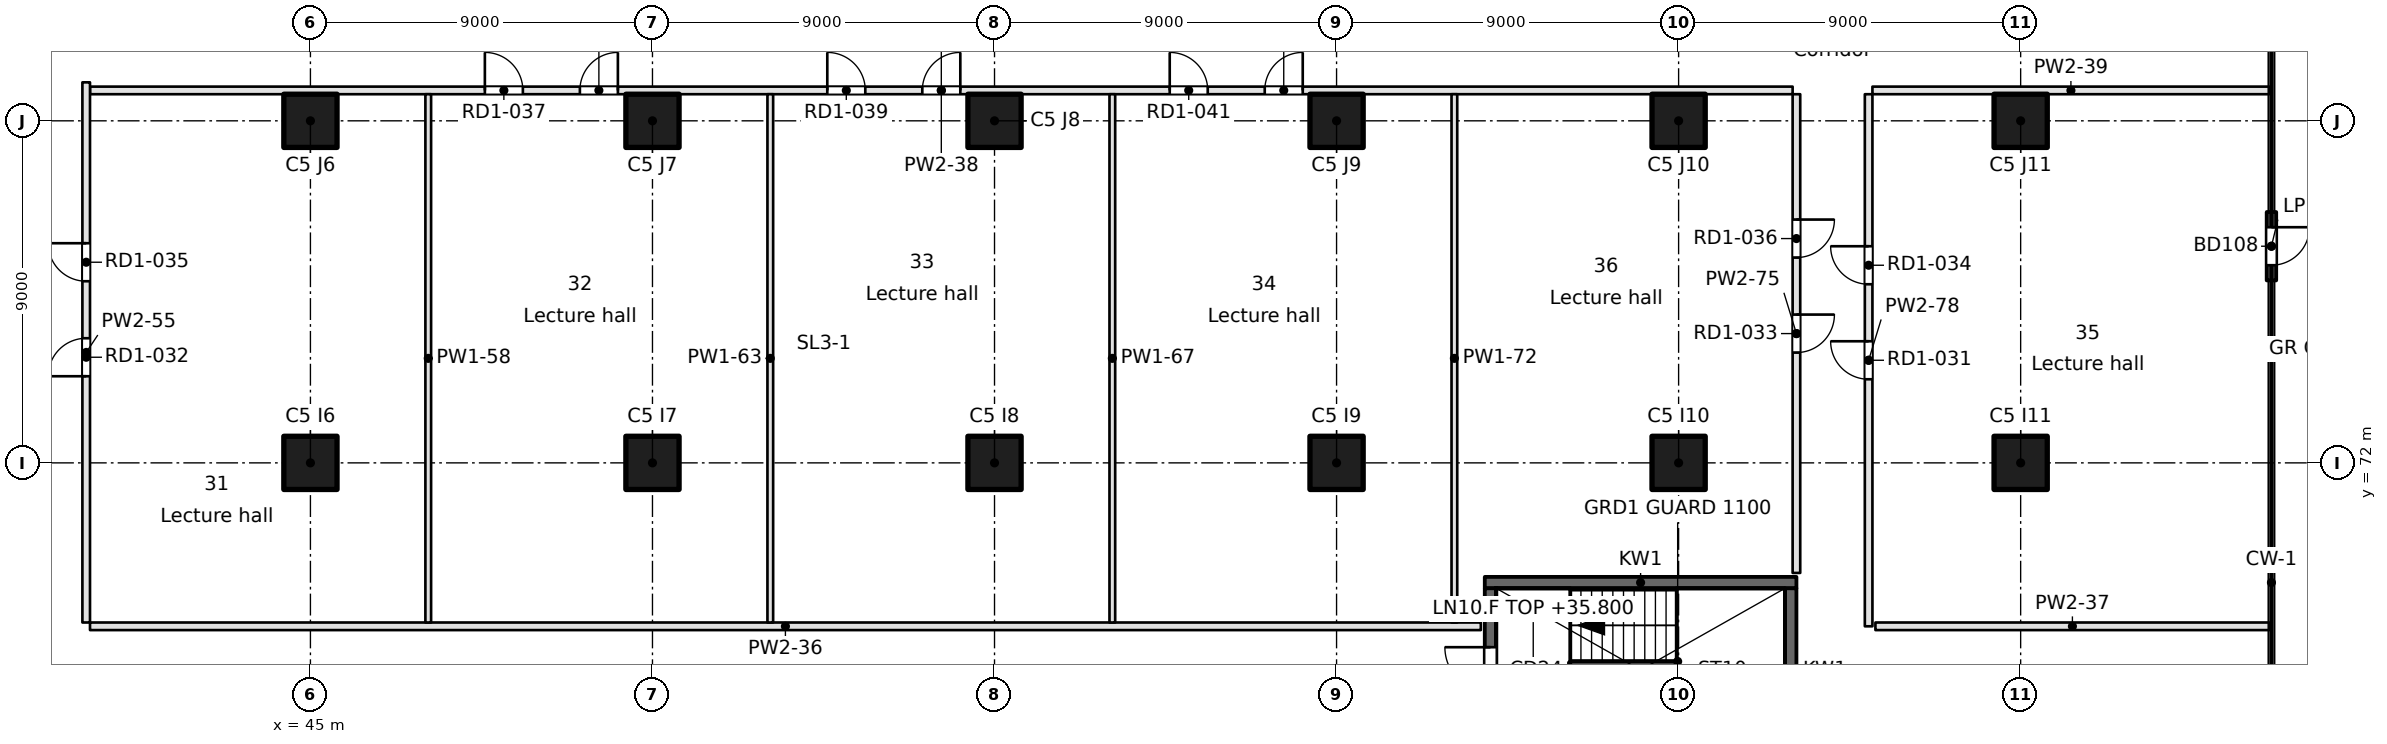
"""IFC4 building model, lengths in metres.
Left out: names, types, materials, properties, quantities, classifications, styles, units other than length and angle.
Written with IfcOpenShell. Run it as: python <this file> out.ifc"""

import sys

from ifc_helpers import new_model, si_unit, direction, frame, frame_2d, origin, origin_2d, place, context, subcontext, project, spatial, rectangle, extrude, element, fill, save


model = new_model("IFC4")
c1 = context("Model", 3, precision=1e-05, world=origin(), true_north=direction((0.0, 1.0)))
c2 = subcontext(c1, "Body", "Model", "MODEL_VIEW")
j1 = project(units=[si_unit("LENGTHUNIT", "METRE"), si_unit("PLANEANGLEUNIT", "RADIAN")], contexts=[c1])
p1 = place(None, origin())
s1 = spatial("IfcSite", under=j1, at=p1, CompositionType="ELEMENT")
p2 = place(p1, origin())
s2 = spatial("IfcBuilding", under=s1, at=p2, CompositionType="ELEMENT")
p3 = place(p2, frame((0.0, 0.0, 35.8)))
s3 = spatial("IfcBuildingStorey", under=s2, at=p3, CompositionType="ELEMENT", Elevation=35.8)
for number, where, z_axis, x_axis in (
    (1, (45.0, 72.0, 0.0), (0.0, 0.0, 1.0), (1.0, 0.0, 0.0)),
    (2, (45.0, 81.0, 0.0), (0.0, 0.0, 1.0), (1.0, 0.0, 0.0)),
    (3, (54.0, 72.0, 0.0), (0.0, 0.0, 1.0), (1.0, 0.0, 0.0)),
    (4, (54.0, 81.0, 0.0), (0.0, 0.0, 1.0), (1.0, 0.0, 0.0)),
    (5, (63.0, 72.0, 0.0), (0.0, 0.0, 1.0), (1.0, 0.0, 0.0)),
    (6, (63.0, 81.0, 0.0), (0.0, 0.0, 1.0), (1.0, 0.0, 0.0)),
    (7, (72.0, 72.0, 0.0), (0.0, 0.0, 1.0), (1.0, 0.0, 0.0)),
    (8, (72.0, 81.0, 0.0), (0.0, 0.0, 1.0), (1.0, 0.0, 0.0)),
    (9, (81.0, 72.0, 0.0), (0.0, 0.0, 1.0), (1.0, 0.0, 0.0)),
    (10, (81.0, 81.0, 0.0), (0.0, 0.0, 1.0), (1.0, 0.0, 0.0)),
    (11, (90.0, 72.0, 0.0), (0.0, 0.0, 1.0), (1.0, 0.0, 0.0)),
    (12, (90.0, 81.0, 0.0), (0.0, 0.0, 1.0), (1.0, 0.0, 0.0)),
):
    element("IfcColumn", number, at=place(p3, frame(where, z_axis=z_axis, x_axis=x_axis)), inside=s3, PredefinedType="COLUMN", context=c2, shape_type="SweptSolid", body=[
        extrude(rectangle(XDim=1.4, YDim=1.4, at=origin_2d()), origin(), (0.0, 0.0, 1.0), 3.7),
    ])
p4 = place(p3, frame((96.599, 76.801, 0.0), z_axis=(0.0, 0.0, 1.0), x_axis=(0.0, 1.0, 0.0)))
e13 = element("IfcWall", 13, at=p4, inside=s3, PredefinedType="SOLIDWALL", context=c2, shape_type="SweptSolid", body=[
    extrude(rectangle(XDim=1.8, YDim=0.25, at=frame_2d((0.9, 0.0))), origin(), (0.0, 0.0, 1.0), 3.3),
])
p5 = place(p4, frame((0.4, 0.0, 0.0)))
e14 = element("IfcOpeningElement", 14, at=p5, cuts=e13, PredefinedType="OPENING", context=c2, shape_type="SweptSolid", body=[
    extrude(rectangle(XDim=1.0, YDim=2.1, at=frame_2d((0.5, 1.05))), frame((0.0, 0.125, 0.0), z_axis=(0.0, -1.0, 0.0), x_axis=(1.0, 0.0, 0.0)), (0.0, 0.0, 1.0), 0.25),
])
p6 = place(p3, frame((75.9, 68.85, -0.4), z_axis=(0.0, 0.0, 1.0), x_axis=(1.0, 0.0, 0.0)))
e15 = element("IfcWall", 15, at=p6, inside=s3, PredefinedType="SOLIDWALL", context=c2, shape_type="SweptSolid", body=[
    extrude(rectangle(XDim=8.2, YDim=0.3, at=frame_2d((4.1, 0.0))), origin(), (0.0, 0.0, 1.0), 3.7),
])
p7 = place(p3, frame((76.05, 64.4, -0.4), z_axis=(0.0, 0.0, 1.0), x_axis=(0.0, 1.0, 0.0)))
e16 = element("IfcWall", 16, at=p7, inside=s3, PredefinedType="SOLIDWALL", context=c2, shape_type="SweptSolid", body=[
    extrude(rectangle(XDim=4.3, YDim=0.3, at=frame_2d((2.15, 0.0))), origin(), (0.0, 0.0, 1.0), 3.7),
])
p8 = place(p7, frame((1.55, 0.0, 0.4)))
e17 = element("IfcOpeningElement", 17, at=p8, cuts=e16, PredefinedType="OPENING", context=c2, shape_type="SweptSolid", body=[
    extrude(rectangle(XDim=1.2, YDim=2.1, at=frame_2d((0.6, 1.05))), frame((0.0, 0.15, 0.0), z_axis=(0.0, -1.0, 0.0), x_axis=(1.0, 0.0, 0.0)), (0.0, 0.0, 1.0), 0.3),
])
p9 = place(p3, frame((83.95, 64.4, -0.4), z_axis=(0.0, 0.0, 1.0), x_axis=(0.0, 1.0, 0.0)))
e18 = element("IfcWall", 18, at=p9, inside=s3, PredefinedType="SOLIDWALL", context=c2, shape_type="SweptSolid", body=[
    extrude(rectangle(XDim=4.3, YDim=0.3, at=frame_2d((2.15, 0.0))), origin(), (0.0, 0.0, 1.0), 3.7),
])
p10 = place(p3, frame((39.2, 67.7, 0.0), z_axis=(0.0, 0.0, 1.0), x_axis=(1.0, 0.0, 0.0)))
e19 = element("IfcWall", 19, at=p10, inside=s3, PredefinedType="PARTITIONING", context=c2, shape_type="SweptSolid", body=[
    extrude(rectangle(XDim=36.596, YDim=0.2, at=frame_2d((18.298, 0.0))), origin(), (0.0, 0.0, 1.0), 3.3),
])
p11 = place(p3, frame((86.178, 67.7, 0.0), z_axis=(0.0, 0.0, 1.0), x_axis=(1.0, 0.0, 0.0)))
e20 = element("IfcWall", 20, at=p11, inside=s3, PredefinedType="PARTITIONING", context=c2, shape_type="SweptSolid", body=[
    extrude(rectangle(XDim=10.366, YDim=0.2, at=frame_2d((5.183, 0.0))), origin(), (0.0, 0.0, 1.0), 3.3),
])
p12 = place(p3, frame((84.0, 81.8, 0.0), z_axis=(0.0, 0.0, 1.0), x_axis=(-1.0, 0.0, 0.0)))
e21 = element("IfcWall", 21, at=p12, inside=s3, PredefinedType="PARTITIONING", context=c2, shape_type="SweptSolid", body=[
    extrude(rectangle(XDim=44.8, YDim=0.2, at=frame_2d((22.4, 0.0))), origin(), (0.0, 0.0, 1.0), 3.3),
])
p13 = place(p12, frame((33.41, 0.0, 0.0)))
e22 = element("IfcOpeningElement", 22, at=p13, cuts=e21, PredefinedType="OPENING", context=c2, shape_type="SweptSolid", body=[
    extrude(rectangle(XDim=1.0, YDim=2.1, at=frame_2d((0.5, 1.05))), frame((0.0, 0.1, 0.0), z_axis=(0.0, -1.0, 0.0), x_axis=(1.0, 0.0, 0.0)), (0.0, 0.0, 1.0), 0.2),
])
p14 = place(p12, frame((30.91, 0.0, 0.0)))
e23 = element("IfcOpeningElement", 23, at=p14, cuts=e21, PredefinedType="OPENING", context=c2, shape_type="SweptSolid", body=[
    extrude(rectangle(XDim=1.0, YDim=2.1, at=frame_2d((0.5, 1.05))), frame((0.0, 0.1, 0.0), z_axis=(0.0, -1.0, 0.0), x_axis=(1.0, 0.0, 0.0)), (0.0, 0.0, 1.0), 0.2),
])
p15 = place(p12, frame((24.4, 0.0, 0.0)))
e24 = element("IfcOpeningElement", 24, at=p15, cuts=e21, PredefinedType="OPENING", context=c2, shape_type="SweptSolid", body=[
    extrude(rectangle(XDim=1.0, YDim=2.1, at=frame_2d((0.5, 1.05))), frame((0.0, 0.1, 0.0), z_axis=(0.0, -1.0, 0.0), x_axis=(1.0, 0.0, 0.0)), (0.0, 0.0, 1.0), 0.2),
])
p16 = place(p12, frame((21.9, 0.0, 0.0)))
e25 = element("IfcOpeningElement", 25, at=p16, cuts=e21, PredefinedType="OPENING", context=c2, shape_type="SweptSolid", body=[
    extrude(rectangle(XDim=1.0, YDim=2.1, at=frame_2d((0.5, 1.05))), frame((0.0, 0.1, 0.0), z_axis=(0.0, -1.0, 0.0), x_axis=(1.0, 0.0, 0.0)), (0.0, 0.0, 1.0), 0.2),
])
p17 = place(p12, frame((15.39, 0.0, 0.0)))
e26 = element("IfcOpeningElement", 26, at=p17, cuts=e21, PredefinedType="OPENING", context=c2, shape_type="SweptSolid", body=[
    extrude(rectangle(XDim=1.0, YDim=2.1, at=frame_2d((0.5, 1.05))), frame((0.0, 0.1, 0.0), z_axis=(0.0, -1.0, 0.0), x_axis=(1.0, 0.0, 0.0)), (0.0, 0.0, 1.0), 0.2),
])
p18 = place(p12, frame((12.89, 0.0, 0.0)))
e27 = element("IfcOpeningElement", 27, at=p18, cuts=e21, PredefinedType="OPENING", context=c2, shape_type="SweptSolid", body=[
    extrude(rectangle(XDim=1.0, YDim=2.1, at=frame_2d((0.5, 1.05))), frame((0.0, 0.1, 0.0), z_axis=(0.0, -1.0, 0.0), x_axis=(1.0, 0.0, 0.0)), (0.0, 0.0, 1.0), 0.2),
])
p19 = place(p3, frame((96.545, 81.8, 0.0), z_axis=(0.0, 0.0, 1.0), x_axis=(-1.0, 0.0, 0.0)))
e28 = element("IfcWall", 28, at=p19, inside=s3, PredefinedType="PARTITIONING", context=c2, shape_type="SweptSolid", body=[
    extrude(rectangle(XDim=10.445, YDim=0.2, at=frame_2d((5.222, 0.0))), origin(), (0.0, 0.0, 1.0), 3.3),
])
p20 = place(p3, frame((39.1, 82.012, 0.0), z_axis=(0.0, 0.0, 1.0), x_axis=(0.0, -1.0, 0.0)))
e29 = element("IfcWall", 29, at=p20, inside=s3, PredefinedType="PARTITIONING", context=c2, shape_type="SweptSolid", body=[
    extrude(rectangle(XDim=14.212, YDim=0.2, at=frame_2d((7.106, 0.0))), origin(), (0.0, 0.0, 1.0), 3.3),
])
p21 = place(p20, frame((6.733, 0.0, 0.0)))
e30 = element("IfcOpeningElement", 30, at=p21, cuts=e29, PredefinedType="OPENING", context=c2, shape_type="SweptSolid", body=[
    extrude(rectangle(XDim=1.0, YDim=2.1, at=frame_2d((0.5, 1.05))), frame((0.0, 0.1, 0.0), z_axis=(0.0, -1.0, 0.0), x_axis=(1.0, 0.0, 0.0)), (0.0, 0.0, 1.0), 0.2),
])
p22 = place(p20, frame((4.233, 0.0, 0.0)))
e31 = element("IfcOpeningElement", 31, at=p22, cuts=e29, PredefinedType="OPENING", context=c2, shape_type="SweptSolid", body=[
    extrude(rectangle(XDim=1.0, YDim=2.1, at=frame_2d((0.5, 1.05))), frame((0.0, 0.1, 0.0), z_axis=(0.0, -1.0, 0.0), x_axis=(1.0, 0.0, 0.0)), (0.0, 0.0, 1.0), 0.2),
])
for number, where, z_axis, x_axis in (
    (32, (48.1, 81.7, 0.0), (0.0, 0.0, 1.0), (0.0, -1.0, 0.0)),
    (33, (57.1, 81.7, 0.0), (0.0, 0.0, 1.0), (0.0, -1.0, 0.0)),
    (34, (66.1, 81.7, 0.0), (0.0, 0.0, 1.0), (0.0, -1.0, 0.0)),
    (35, (75.1, 81.7, 0.0), (0.0, 0.0, 1.0), (0.0, -1.0, 0.0)),
):
    element("IfcWall", number, at=place(p3, frame(where, z_axis=z_axis, x_axis=x_axis)), inside=s3, PredefinedType="PARTITIONING", context=c2, shape_type="SweptSolid", body=[
        extrude(rectangle(XDim=13.9, YDim=0.15, at=frame_2d((6.95, 0.0))), origin(), (0.0, 0.0, 1.0), 3.3),
    ])
p23 = place(p3, frame((84.1, 69.104, 0.0), z_axis=(0.0, 0.0, 1.0), x_axis=(0.0, 1.0, 0.0)))
e36 = element("IfcWall", 36, at=p23, inside=s3, PredefinedType="PARTITIONING", context=c2, shape_type="SweptSolid", body=[
    extrude(rectangle(XDim=12.596, YDim=0.2, at=frame_2d((6.298, 0.0))), origin(), (0.0, 0.0, 1.0), 3.3),
])
p24 = place(p23, frame((5.798, 0.0, 0.0)))
e37 = element("IfcOpeningElement", 37, at=p24, cuts=e36, PredefinedType="OPENING", context=c2, shape_type="SweptSolid", body=[
    extrude(rectangle(XDim=1.0, YDim=2.1, at=frame_2d((0.5, 1.05))), frame((0.0, 0.1, 0.0), z_axis=(0.0, -1.0, 0.0), x_axis=(1.0, 0.0, 0.0)), (0.0, 0.0, 1.0), 0.2),
])
p25 = place(p23, frame((8.298, 0.0, 0.0)))
e38 = element("IfcOpeningElement", 38, at=p25, cuts=e36, PredefinedType="OPENING", context=c2, shape_type="SweptSolid", body=[
    extrude(rectangle(XDim=1.0, YDim=2.1, at=frame_2d((0.5, 1.05))), frame((0.0, 0.1, 0.0), z_axis=(0.0, -1.0, 0.0), x_axis=(1.0, 0.0, 0.0)), (0.0, 0.0, 1.0), 0.2),
])
p26 = place(p3, frame((86.0, 81.7, 0.0), z_axis=(0.0, 0.0, 1.0), x_axis=(0.0, -1.0, 0.0)))
e39 = element("IfcWall", 39, at=p26, inside=s3, PredefinedType="PARTITIONING", context=c2, shape_type="SweptSolid", body=[
    extrude(rectangle(XDim=14.0, YDim=0.2, at=frame_2d((7.0, 0.0))), origin(), (0.0, 0.0, 1.0), 3.3),
])
p27 = place(p26, frame((6.5, 0.0, 0.0)))
e40 = element("IfcOpeningElement", 40, at=p27, cuts=e39, PredefinedType="OPENING", context=c2, shape_type="SweptSolid", body=[
    extrude(rectangle(XDim=1.0, YDim=2.1, at=frame_2d((0.5, 1.05))), frame((0.0, 0.1, 0.0), z_axis=(0.0, -1.0, 0.0), x_axis=(1.0, 0.0, 0.0)), (0.0, 0.0, 1.0), 0.2),
])
p28 = place(p26, frame((4.0, 0.0, 0.0)))
e41 = element("IfcOpeningElement", 41, at=p28, cuts=e39, PredefinedType="OPENING", context=c2, shape_type="SweptSolid", body=[
    extrude(rectangle(XDim=1.0, YDim=2.1, at=frame_2d((0.5, 1.05))), frame((0.0, 0.1, 0.0), z_axis=(0.0, -1.0, 0.0), x_axis=(1.0, 0.0, 0.0)), (0.0, 0.0, 1.0), 0.2),
])
p29 = place(p5, frame((1.0, 0.0, 0.0), z_axis=(0.0, 0.0, 1.0), x_axis=(-1.0, 0.0, 0.0)))
e42 = element("IfcDoor", 42, at=p29, inside=s3, OperationType="SINGLE_SWING_LEFT", PredefinedType="DOOR", context=c2, shape_type="SweptSolid", body=[
    extrude(rectangle(XDim=1.0, YDim=2.1, at=frame_2d((0.5, 1.05))), frame((0.0, 0.025, 0.0), z_axis=(0.0, -1.0, 0.0), x_axis=(1.0, 0.0, 0.0)), (0.0, 0.0, 1.0), 0.05),
])
fill(e14, e42)
p30 = place(p8, origin())
e43 = element("IfcDoor", 43, at=p30, inside=s3, OperationType="SINGLE_SWING_RIGHT", PredefinedType="DOOR", context=c2, shape_type="SweptSolid", body=[
    extrude(rectangle(XDim=1.2, YDim=2.1, at=frame_2d((0.6, 1.05))), frame((0.0, 0.025, 0.0), z_axis=(0.0, -1.0, 0.0), x_axis=(1.0, 0.0, 0.0)), (0.0, 0.0, 1.0), 0.05),
])
fill(e17, e43)
p31 = place(p27, frame((1.0, 0.0, 0.0), z_axis=(0.0, 0.0, 1.0), x_axis=(-1.0, 0.0, 0.0)))
e44 = element("IfcDoor", 44, at=p31, inside=s3, OperationType="SINGLE_SWING_RIGHT", PredefinedType="DOOR", context=c2, shape_type="SweptSolid", body=[
    extrude(rectangle(XDim=1.0, YDim=2.1, at=frame_2d((0.5, 1.05))), frame((0.0, 0.025, 0.0), z_axis=(0.0, -1.0, 0.0), x_axis=(1.0, 0.0, 0.0)), (0.0, 0.0, 1.0), 0.05),
])
fill(e40, e44)
p32 = place(p21, frame((1.0, 0.0, 0.0), z_axis=(0.0, 0.0, 1.0), x_axis=(-1.0, 0.0, 0.0)))
e45 = element("IfcDoor", 45, at=p32, inside=s3, OperationType="SINGLE_SWING_LEFT", PredefinedType="DOOR", context=c2, shape_type="SweptSolid", body=[
    extrude(rectangle(XDim=1.0, YDim=2.1, at=frame_2d((0.5, 1.05))), frame((0.0, 0.025, 0.0), z_axis=(0.0, -1.0, 0.0), x_axis=(1.0, 0.0, 0.0)), (0.0, 0.0, 1.0), 0.05),
])
fill(e30, e45)
p33 = place(p24, frame((1.0, 0.0, 0.0), z_axis=(0.0, 0.0, 1.0), x_axis=(-1.0, 0.0, 0.0)))
e46 = element("IfcDoor", 46, at=p33, inside=s3, OperationType="SINGLE_SWING_LEFT", PredefinedType="DOOR", context=c2, shape_type="SweptSolid", body=[
    extrude(rectangle(XDim=1.0, YDim=2.1, at=frame_2d((0.5, 1.05))), frame((0.0, 0.025, 0.0), z_axis=(0.0, -1.0, 0.0), x_axis=(1.0, 0.0, 0.0)), (0.0, 0.0, 1.0), 0.05),
])
fill(e37, e46)
p34 = place(p28, frame((1.0, 0.0, 0.0), z_axis=(0.0, 0.0, 1.0), x_axis=(-1.0, 0.0, 0.0)))
e47 = element("IfcDoor", 47, at=p34, inside=s3, OperationType="SINGLE_SWING_RIGHT", PredefinedType="DOOR", context=c2, shape_type="SweptSolid", body=[
    extrude(rectangle(XDim=1.0, YDim=2.1, at=frame_2d((0.5, 1.05))), frame((0.0, 0.025, 0.0), z_axis=(0.0, -1.0, 0.0), x_axis=(1.0, 0.0, 0.0)), (0.0, 0.0, 1.0), 0.05),
])
fill(e41, e47)
p35 = place(p22, frame((1.0, 0.0, 0.0), z_axis=(0.0, 0.0, 1.0), x_axis=(-1.0, 0.0, 0.0)))
e48 = element("IfcDoor", 48, at=p35, inside=s3, OperationType="SINGLE_SWING_RIGHT", PredefinedType="DOOR", context=c2, shape_type="SweptSolid", body=[
    extrude(rectangle(XDim=1.0, YDim=2.1, at=frame_2d((0.5, 1.05))), frame((0.0, 0.025, 0.0), z_axis=(0.0, -1.0, 0.0), x_axis=(1.0, 0.0, 0.0)), (0.0, 0.0, 1.0), 0.05),
])
fill(e31, e48)
p36 = place(p25, frame((1.0, 0.0, 0.0), z_axis=(0.0, 0.0, 1.0), x_axis=(-1.0, 0.0, 0.0)))
e49 = element("IfcDoor", 49, at=p36, inside=s3, OperationType="SINGLE_SWING_LEFT", PredefinedType="DOOR", context=c2, shape_type="SweptSolid", body=[
    extrude(rectangle(XDim=1.0, YDim=2.1, at=frame_2d((0.5, 1.05))), frame((0.0, 0.025, 0.0), z_axis=(0.0, -1.0, 0.0), x_axis=(1.0, 0.0, 0.0)), (0.0, 0.0, 1.0), 0.05),
])
fill(e38, e49)
p37 = place(p13, frame((1.0, 0.0, 0.0), z_axis=(0.0, 0.0, 1.0), x_axis=(-1.0, 0.0, 0.0)))
e50 = element("IfcDoor", 50, at=p37, inside=s3, OperationType="SINGLE_SWING_LEFT", PredefinedType="DOOR", context=c2, shape_type="SweptSolid", body=[
    extrude(rectangle(XDim=1.0, YDim=2.1, at=frame_2d((0.5, 1.05))), frame((0.0, 0.025, 0.0), z_axis=(0.0, -1.0, 0.0), x_axis=(1.0, 0.0, 0.0)), (0.0, 0.0, 1.0), 0.05),
])
fill(e22, e50)
p38 = place(p14, frame((1.0, 0.0, 0.0), z_axis=(0.0, 0.0, 1.0), x_axis=(-1.0, 0.0, 0.0)))
e51 = element("IfcDoor", 51, at=p38, inside=s3, OperationType="SINGLE_SWING_RIGHT", PredefinedType="DOOR", context=c2, shape_type="SweptSolid", body=[
    extrude(rectangle(XDim=1.0, YDim=2.1, at=frame_2d((0.5, 1.05))), frame((0.0, 0.025, 0.0), z_axis=(0.0, -1.0, 0.0), x_axis=(1.0, 0.0, 0.0)), (0.0, 0.0, 1.0), 0.05),
])
fill(e23, e51)
p39 = place(p15, frame((1.0, 0.0, 0.0), z_axis=(0.0, 0.0, 1.0), x_axis=(-1.0, 0.0, 0.0)))
e52 = element("IfcDoor", 52, at=p39, inside=s3, OperationType="SINGLE_SWING_LEFT", PredefinedType="DOOR", context=c2, shape_type="SweptSolid", body=[
    extrude(rectangle(XDim=1.0, YDim=2.1, at=frame_2d((0.5, 1.05))), frame((0.0, 0.025, 0.0), z_axis=(0.0, -1.0, 0.0), x_axis=(1.0, 0.0, 0.0)), (0.0, 0.0, 1.0), 0.05),
])
fill(e24, e52)
p40 = place(p16, frame((1.0, 0.0, 0.0), z_axis=(0.0, 0.0, 1.0), x_axis=(-1.0, 0.0, 0.0)))
e53 = element("IfcDoor", 53, at=p40, inside=s3, OperationType="SINGLE_SWING_RIGHT", PredefinedType="DOOR", context=c2, shape_type="SweptSolid", body=[
    extrude(rectangle(XDim=1.0, YDim=2.1, at=frame_2d((0.5, 1.05))), frame((0.0, 0.025, 0.0), z_axis=(0.0, -1.0, 0.0), x_axis=(1.0, 0.0, 0.0)), (0.0, 0.0, 1.0), 0.05),
])
fill(e25, e53)
p41 = place(p17, frame((1.0, 0.0, 0.0), z_axis=(0.0, 0.0, 1.0), x_axis=(-1.0, 0.0, 0.0)))
e54 = element("IfcDoor", 54, at=p41, inside=s3, OperationType="SINGLE_SWING_LEFT", PredefinedType="DOOR", context=c2, shape_type="SweptSolid", body=[
    extrude(rectangle(XDim=1.0, YDim=2.1, at=frame_2d((0.5, 1.05))), frame((0.0, 0.025, 0.0), z_axis=(0.0, -1.0, 0.0), x_axis=(1.0, 0.0, 0.0)), (0.0, 0.0, 1.0), 0.05),
])
fill(e26, e54)
p42 = place(p18, frame((1.0, 0.0, 0.0), z_axis=(0.0, 0.0, 1.0), x_axis=(-1.0, 0.0, 0.0)))
e55 = element("IfcDoor", 55, at=p42, inside=s3, OperationType="SINGLE_SWING_RIGHT", PredefinedType="DOOR", context=c2, shape_type="SweptSolid", body=[
    extrude(rectangle(XDim=1.0, YDim=2.1, at=frame_2d((0.5, 1.05))), frame((0.0, 0.025, 0.0), z_axis=(0.0, -1.0, 0.0), x_axis=(1.0, 0.0, 0.0)), (0.0, 0.0, 1.0), 0.05),
])
fill(e27, e55)
save(model, sys.argv[1])
